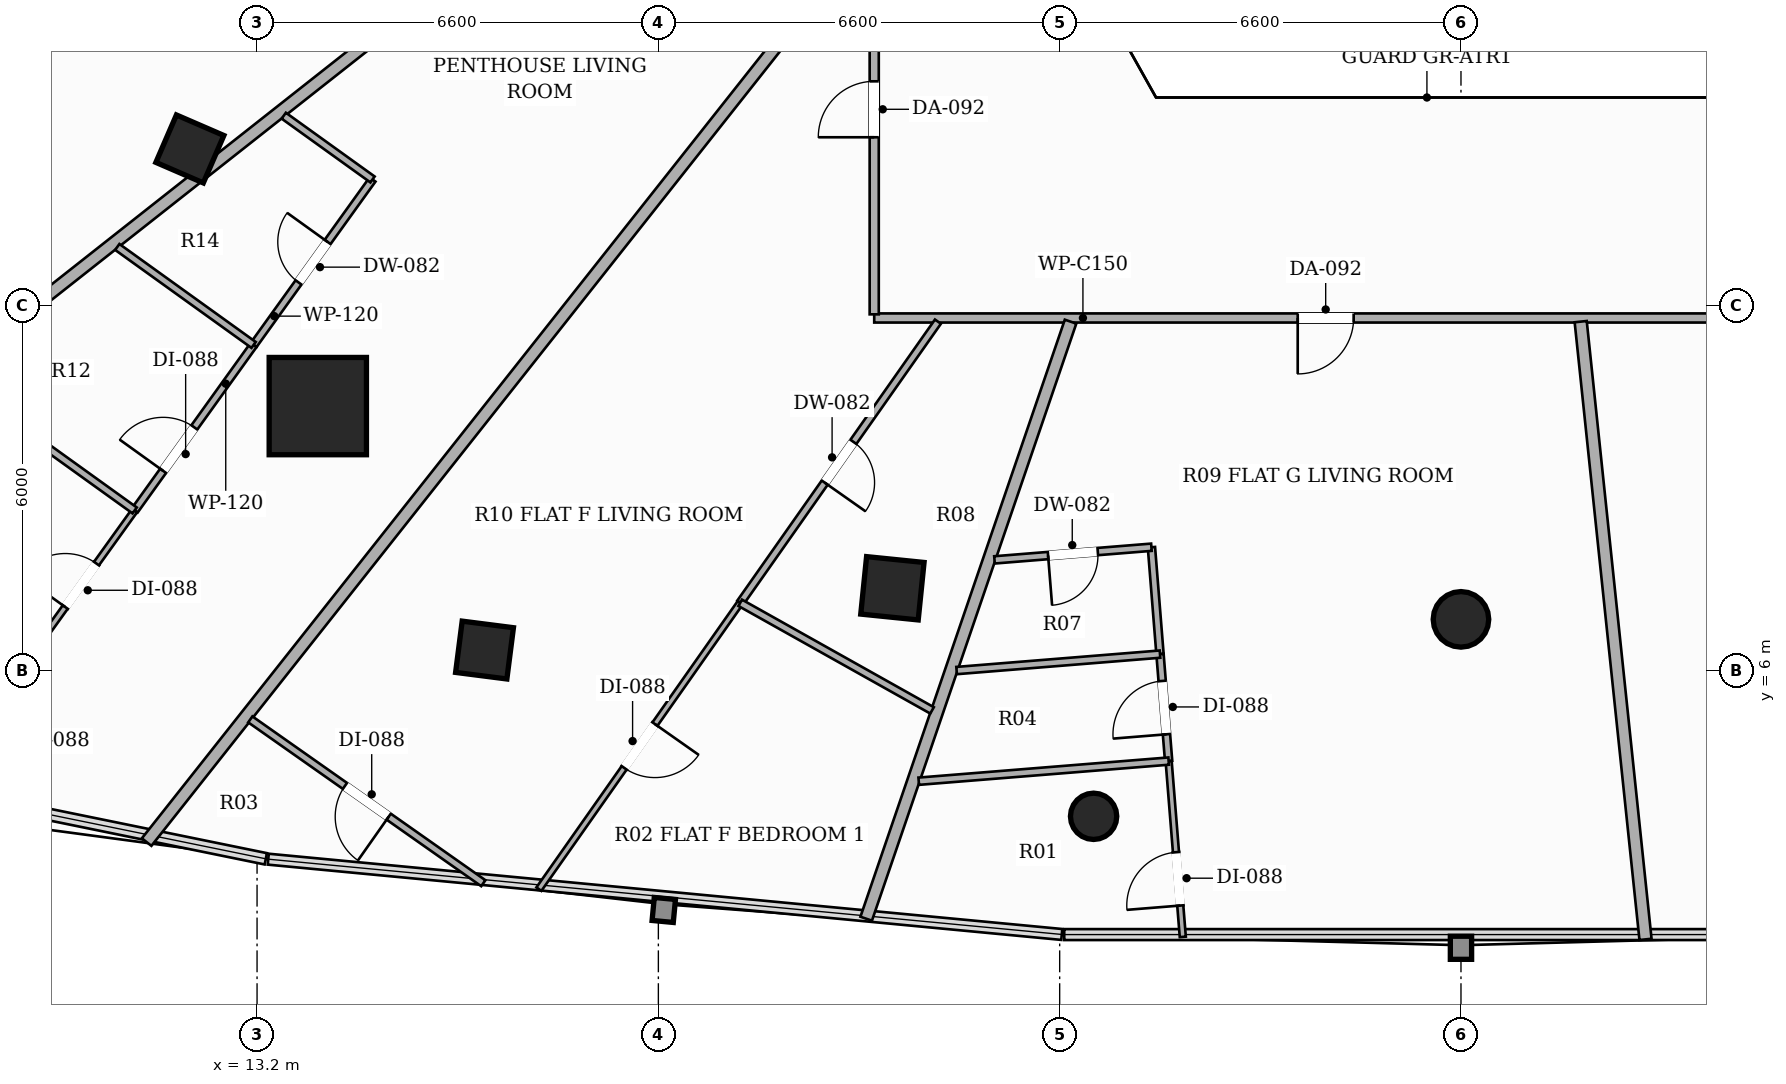
"""IFC4 building model, lengths in metres.
Left out: names, types, materials, properties, quantities, classifications, styles, units other than length and angle.
Written with IfcOpenShell. Run it as: python <this file> out.ifc"""

import sys

from ifc_helpers import new_model, si_unit, direction, frame, frame_2d, origin, origin_2d, place, context, subcontext, project, spatial, rectangle, hollow_rectangle, hollow_circle, extrude, element, fill, save


model = new_model("IFC4")
c1 = context("Model", 3, precision=1e-05, world=origin(), true_north=direction((0.0, 1.0)))
c2 = subcontext(c1, "Body", "Model", "MODEL_VIEW")
j1 = project(units=[si_unit("LENGTHUNIT", "METRE"), si_unit("PLANEANGLEUNIT", "RADIAN")], contexts=[c1])
p1 = place(None, origin())
s1 = spatial("IfcSite", under=j1, at=p1, CompositionType="ELEMENT")
p2 = place(p1, origin())
s2 = spatial("IfcBuilding", under=s1, at=p2, CompositionType="ELEMENT")
p3 = place(p2, frame((0.0, 0.0, 56.6)))
s3 = spatial("IfcBuildingStorey", under=s2, at=p3, CompositionType="ELEMENT", Elevation=56.6)
p4 = place(p3, frame((14.199, 10.351, 0.0), z_axis=(0.0, 0.0, 1.0), x_axis=(1.0, 0.0, 0.0)))
e1 = element("IfcColumn", 1, at=p4, inside=s3, PredefinedType="COLUMN", context=c2, shape_type="SweptSolid", body=[
    extrude(hollow_rectangle(XDim=1.6, YDim=1.6, WallThickness=0.05, at=origin_2d()), origin(), (0.0, 0.0, 1.0), 3.3),
])
p5 = place(p3, frame((23.649, 7.355, 0.0), z_axis=(0.0, 0.0, 1.0), x_axis=(-0.994880708829, 0.101056297183, 0.0)))
e2 = element("IfcColumn", 2, at=p5, inside=s3, PredefinedType="COLUMN", context=c2, shape_type="SweptSolid", body=[
    extrude(hollow_rectangle(XDim=0.95, YDim=0.95, WallThickness=0.032, at=origin_2d()), origin(), (0.0, 0.0, 1.0), 3.3),
])
p6 = place(p3, frame((33.0, 6.844, 0.0), z_axis=(0.0, 0.0, 1.0), x_axis=(1.0, 0.0, 0.0)))
e3 = element("IfcColumn", 3, at=p6, inside=s3, PredefinedType="COLUMN", context=c2, shape_type="SweptSolid", body=[
    extrude(hollow_circle(Radius=0.457, WallThickness=0.025, at=origin_2d()), origin(), (0.0, 0.0, 1.0), 3.3),
])
for number, where, z_axis, x_axis in (
    (4, (12.095, 14.58, 0.0), (0.0, 0.0, 1.0), (0.397, 0.918, 0.0)),
    (5, (16.941, 6.339, 0.0), (0.0, 0.0, 1.0), (-0.992, 0.127, 0.0)),
):
    element("IfcColumn", number, at=place(p3, frame(where, z_axis=z_axis, x_axis=x_axis)), inside=s3, PredefinedType="COLUMN", context=c2, shape_type="SweptSolid", body=[
        extrude(hollow_rectangle(XDim=0.85, YDim=0.85, WallThickness=0.028, at=origin_2d()), origin(), (0.0, 0.0, 1.0), 3.3),
    ])
p7 = place(p3, frame((26.958, 3.605, 0.0), z_axis=(0.0, 0.0, 1.0), x_axis=(1.0, 0.0, 0.0)))
e6 = element("IfcColumn", 6, at=p7, inside=s3, PredefinedType="COLUMN", context=c2, shape_type="SweptSolid", body=[
    extrude(hollow_circle(Radius=0.381, WallThickness=0.022, at=origin_2d()), origin(), (0.0, 0.0, 1.0), 3.3),
])
p8 = place(p3, frame((42.59, 11.8, 0.0), z_axis=(0.0, 0.0, 1.0), x_axis=(-1.0, 0.0, 0.0)))
e7 = element("IfcWall", 7, at=p8, inside=s3, PredefinedType="PARTITIONING", context=c2, shape_type="SweptSolid", body=[
    extrude(rectangle(XDim=19.24, YDim=0.15, at=frame_2d((9.62, 0.0))), origin(), (0.0, 0.0, 1.0), 2.629),
])
p9 = place(p8, frame((11.355, 0.0, 0.0)))
e8 = element("IfcOpeningElement", 8, at=p9, cuts=e7, PredefinedType="OPENING", context=c2, shape_type="SweptSolid", body=[
    extrude(rectangle(XDim=0.92, YDim=2.15, at=frame_2d((0.46, 1.075))), frame((0.0, 0.085, 0.0), z_axis=(0.0, -1.0, 0.0), x_axis=(1.0, 0.0, 0.0)), (0.0, 0.0, 1.0), 0.17),
])
p10 = place(p8, frame((3.524, 0.0, 0.0)))
e9 = element("IfcOpeningElement", 9, at=p10, cuts=e7, PredefinedType="OPENING", context=c2, shape_type="SweptSolid", body=[
    extrude(rectangle(XDim=0.88, YDim=2.1, at=frame_2d((0.44, 1.05))), frame((0.0, 0.085, 0.0), z_axis=(0.0, -1.0, 0.0), x_axis=(1.0, 0.0, 0.0)), (0.0, 0.0, 1.0), 0.17),
])
p11 = place(p3, frame((23.35, 11.86, 0.0), z_axis=(0.0, 0.0, 1.0), x_axis=(0.0, 1.0, 0.0)))
e10 = element("IfcWall", 10, at=p11, inside=s3, PredefinedType="PARTITIONING", context=c2, shape_type="SweptSolid", body=[
    extrude(rectangle(XDim=25.04, YDim=0.15, at=frame_2d((12.52, 0.0))), origin(), (0.0, 0.0, 1.0), 2.373),
])
p12 = place(p11, frame((15.434, 0.0, 0.0)))
e11 = element("IfcOpeningElement", 11, at=p12, cuts=e10, PredefinedType="OPENING", context=c2, shape_type="SweptSolid", body=[
    extrude(rectangle(XDim=0.88, YDim=2.1, at=frame_2d((0.44, 1.05))), frame((0.0, 0.085, 0.0), z_axis=(0.0, -1.0, 0.0), x_axis=(1.0, 0.0, 0.0)), (0.0, 0.0, 1.0), 0.17),
])
p13 = place(p11, frame((22.315, 0.0, 0.0)))
e12 = element("IfcOpeningElement", 12, at=p13, cuts=e10, PredefinedType="OPENING", context=c2, shape_type="SweptSolid", body=[
    extrude(rectangle(XDim=0.88, YDim=2.1, at=frame_2d((0.44, 1.05))), frame((0.0, 0.085, 0.0), z_axis=(0.0, -1.0, 0.0), x_axis=(1.0, 0.0, 0.0)), (0.0, 0.0, 1.0), 0.17),
])
p14 = place(p11, frame((8.21, 0.0, 0.0)))
e13 = element("IfcOpeningElement", 13, at=p14, cuts=e10, PredefinedType="OPENING", context=c2, shape_type="SweptSolid", body=[
    extrude(rectangle(XDim=0.92, YDim=2.15, at=frame_2d((0.46, 1.075))), frame((0.0, 0.085, 0.0), z_axis=(0.0, -1.0, 0.0), x_axis=(1.0, 0.0, 0.0)), (0.0, 0.0, 1.0), 0.17),
])
p15 = place(p11, frame((2.912, 0.0, 0.0)))
e14 = element("IfcOpeningElement", 14, at=p15, cuts=e10, PredefinedType="OPENING", context=c2, shape_type="SweptSolid", body=[
    extrude(rectangle(XDim=0.92, YDim=2.15, at=frame_2d((0.46, 1.075))), frame((0.0, 0.085, 0.0), z_axis=(0.0, -1.0, 0.0), x_axis=(1.0, 0.0, 0.0)), (0.0, 0.0, 1.0), 0.17),
])
p16 = place(p3, frame((23.29, 22.844, 0.0), z_axis=(0.0, 0.0, 1.0), x_axis=(-0.785302077685, -0.619112790034, 0.0)))
e15 = element("IfcWall", 15, at=p16, inside=s3, PredefinedType="PARTITIONING", context=c2, shape_type="SweptSolid", body=[
    extrude(rectangle(XDim=22.957, YDim=0.2, at=frame_2d((11.479, 0.0))), origin(), (0.0, 0.0, 1.0), 2.373),
])
p17 = place(p3, frame((23.29, 18.228, 0.0), z_axis=(0.0, 0.0, 1.0), x_axis=(-0.620501189922, -0.784205504511, 0.0)))
e16 = element("IfcWall", 16, at=p17, inside=s3, PredefinedType="PARTITIONING", context=c2, shape_type="SweptSolid", body=[
    extrude(rectangle(XDim=19.188, YDim=0.2, at=frame_2d((9.594, 0.0))), origin(), (0.0, 0.0, 1.0), 2.373),
])
p18 = place(p3, frame((26.579, 11.74, 0.0), z_axis=(0.0, 0.0, 1.0), x_axis=(-0.32385337678, -0.946107282684, 0.0)))
e17 = element("IfcWall", 17, at=p18, inside=s3, PredefinedType="PARTITIONING", context=c2, shape_type="SweptSolid", body=[
    extrude(rectangle(XDim=10.378, YDim=0.2, at=frame_2d((5.189, 0.0))), origin(), (0.0, 0.0, 1.0), 2.373),
])
p19 = place(p3, frame((34.969, 11.74, 0.0), z_axis=(0.0, 0.0, 1.0), x_axis=(0.10435134466, -0.994540495338, 0.0)))
e18 = element("IfcWall", 18, at=p19, inside=s3, PredefinedType="PARTITIONING", context=c2, shape_type="SweptSolid", body=[
    extrude(rectangle(XDim=10.215, YDim=0.2, at=frame_2d((5.107, 0.0))), origin(), (0.0, 0.0, 1.0), 2.373),
])
p20 = place(p3, frame((13.143, 11.357, 0.0), z_axis=(0.0, 0.0, 1.0), x_axis=(0.583709603858, 0.811962498127, 0.0)))
e19 = element("IfcWall", 19, at=p20, inside=s3, PredefinedType="PARTITIONING", context=c2, shape_type="SweptSolid", body=[
    extrude(rectangle(XDim=3.351, YDim=0.12, at=frame_2d((1.676, 0.0))), origin(), (0.0, 0.0, 1.0), 2.373),
])
p21 = place(p20, frame((1.266, 0.0, 0.0)))
e20 = element("IfcOpeningElement", 20, at=p21, cuts=e19, PredefinedType="OPENING", context=c2, shape_type="SweptSolid", body=[
    extrude(rectangle(XDim=0.82, YDim=2.1, at=frame_2d((0.41, 1.05))), frame((0.0, 0.07, 0.0), z_axis=(0.0, -1.0, 0.0), x_axis=(1.0, 0.0, 0.0)), (0.0, 0.0, 1.0), 0.14),
])
p22 = place(p3, frame((15.099, 14.078, 0.0), z_axis=(0.0, 0.0, 1.0), x_axis=(-0.812134003072, 0.583470959906, 0.0)))
e21 = element("IfcWall", 21, at=p22, inside=s3, PredefinedType="PARTITIONING", context=c2, shape_type="SweptSolid", body=[
    extrude(rectangle(XDim=1.798, YDim=0.12, at=frame_2d((0.899, 0.0))), origin(), (0.0, 0.0, 1.0), 3.02),
])
p23 = place(p3, frame((11.187, 8.635, 0.0), z_axis=(0.0, 0.0, 1.0), x_axis=(0.583571510595, 0.812061753823, 0.0)))
e22 = element("IfcWall", 22, at=p23, inside=s3, PredefinedType="PARTITIONING", context=c2, shape_type="SweptSolid", body=[
    extrude(rectangle(XDim=3.352, YDim=0.12, at=frame_2d((1.676, 0.0))), origin(), (0.0, 0.0, 1.0), 2.579),
])
p24 = place(p23, frame((0.802, 0.0, 0.0)))
e23 = element("IfcOpeningElement", 23, at=p24, cuts=e22, PredefinedType="OPENING", context=c2, shape_type="SweptSolid", body=[
    extrude(rectangle(XDim=0.88, YDim=2.1, at=frame_2d((0.44, 1.05))), frame((0.0, 0.07, 0.0), z_axis=(0.0, -1.0, 0.0), x_axis=(1.0, 0.0, 0.0)), (0.0, 0.0, 1.0), 0.14),
])
p25 = place(p3, frame((9.417, 6.172, 0.0), z_axis=(0.0, 0.0, 1.0), x_axis=(0.583596240012, 0.812043981964, 0.0)))
e24 = element("IfcWall", 24, at=p25, inside=s3, PredefinedType="PARTITIONING", context=c2, shape_type="SweptSolid", body=[
    extrude(rectangle(XDim=3.033, YDim=0.1, at=frame_2d((1.517, 0.0))), origin(), (0.0, 0.0, 1.0), 2.579),
])
p26 = place(p25, frame((1.077, 0.0, 0.0)))
e25 = element("IfcOpeningElement", 25, at=p26, cuts=e24, PredefinedType="OPENING", context=c2, shape_type="SweptSolid", body=[
    extrude(rectangle(XDim=0.88, YDim=2.1, at=frame_2d((0.44, 1.05))), frame((0.0, 0.06, 0.0), z_axis=(0.0, -1.0, 0.0), x_axis=(1.0, 0.0, 0.0)), (0.0, 0.0, 1.0), 0.12),
])
p27 = place(p3, frame((13.143, 11.357, 0.0), z_axis=(0.0, 0.0, 1.0), x_axis=(-0.812099176387, 0.583519432162, 0.0)))
e26 = element("IfcWall", 26, at=p27, inside=s3, PredefinedType="PARTITIONING", context=c2, shape_type="SweptSolid", body=[
    extrude(rectangle(XDim=2.761, YDim=0.12, at=frame_2d((1.38, 0.0))), origin(), (0.0, 0.0, 1.0), 3.02),
])
p28 = place(p3, frame((11.187, 8.635, 0.0), z_axis=(0.0, 0.0, 1.0), x_axis=(-0.812025077548, 0.583622543629, 0.0)))
e27 = element("IfcWall", 27, at=p28, inside=s3, PredefinedType="PARTITIONING", context=c2, shape_type="SweptSolid", body=[
    extrude(rectangle(XDim=3.725, YDim=0.12, at=frame_2d((1.863, 0.0))), origin(), (0.0, 0.0, 1.0), 2.579),
])
p29 = place(p3, frame((24.398, 11.74, 0.0), z_axis=(0.0, 0.0, 1.0), x_axis=(-0.575258030062, -0.817972003707, 0.0)))
e28 = element("IfcWall", 28, at=p29, inside=s3, PredefinedType="PARTITIONING", context=c2, shape_type="SweptSolid", body=[
    extrude(rectangle(XDim=5.653, YDim=0.12, at=frame_2d((2.827, 0.0))), origin(), (0.0, 0.0, 1.0), 2.373),
])
p30 = place(p29, frame((2.417, 0.0, 0.0)))
e29 = element("IfcOpeningElement", 29, at=p30, cuts=e28, PredefinedType="OPENING", context=c2, shape_type="SweptSolid", body=[
    extrude(rectangle(XDim=0.82, YDim=2.1, at=frame_2d((0.41, 1.05))), frame((0.0, 0.07, 0.0), z_axis=(0.0, -1.0, 0.0), x_axis=(1.0, 0.0, 0.0)), (0.0, 0.0, 1.0), 0.14),
])
p31 = place(p3, frame((16.921, 2.505, 0.0), z_axis=(0.0, 0.0, 1.0), x_axis=(-0.818042569522, 0.575157677902, 0.0)))
e30 = element("IfcWall", 30, at=p31, inside=s3, PredefinedType="PARTITIONING", context=c2, shape_type="SweptSolid", body=[
    extrude(rectangle(XDim=4.684, YDim=0.12, at=frame_2d((2.342, 0.0))), origin(), (0.0, 0.0, 1.0), 2.579),
])
p32 = place(p31, frame((1.902, 0.0, 0.0)))
e31 = element("IfcOpeningElement", 31, at=p32, cuts=e30, PredefinedType="OPENING", context=c2, shape_type="SweptSolid", body=[
    extrude(rectangle(XDim=0.88, YDim=2.1, at=frame_2d((0.44, 1.05))), frame((0.0, 0.07, 0.0), z_axis=(0.0, -1.0, 0.0), x_axis=(1.0, 0.0, 0.0)), (0.0, 0.0, 1.0), 0.14),
])
p33 = place(p3, frame((21.146, 7.116, 0.0), z_axis=(0.0, 0.0, 1.0), x_axis=(-0.575180299529, -0.818026664011, 0.0)))
e32 = element("IfcWall", 32, at=p33, inside=s3, PredefinedType="PARTITIONING", context=c2, shape_type="SweptSolid", body=[
    extrude(rectangle(XDim=5.757, YDim=0.1, at=frame_2d((2.878, 0.0))), origin(), (0.0, 0.0, 1.0), 2.373),
])
p34 = place(p33, frame((2.438, 0.0, 0.0)))
e33 = element("IfcOpeningElement", 33, at=p34, cuts=e32, PredefinedType="OPENING", context=c2, shape_type="SweptSolid", body=[
    extrude(rectangle(XDim=0.88, YDim=2.1, at=frame_2d((0.44, 1.05))), frame((0.0, 0.06, 0.0), z_axis=(0.0, -1.0, 0.0), x_axis=(1.0, 0.0, 0.0)), (0.0, 0.0, 1.0), 0.12),
])
p35 = place(p3, frame((24.301, 5.347, 0.0), z_axis=(0.0, 0.0, 1.0), x_axis=(-0.872243471816, 0.48907190256, 0.0)))
e34 = element("IfcWall", 34, at=p35, inside=s3, PredefinedType="PARTITIONING", context=c2, shape_type="SweptSolid", body=[
    extrude(rectangle(XDim=3.617, YDim=0.12, at=frame_2d((1.809, 0.0))), origin(), (0.0, 0.0, 1.0), 2.373),
])
p36 = place(p3, frame((28.05, 6.272, 0.0), z_axis=(0.0, 0.0, 1.0), x_axis=(-0.080009304194, 0.996794116778, 0.0)))
e35 = element("IfcWall", 35, at=p36, inside=s3, PredefinedType="PARTITIONING", context=c2, shape_type="SweptSolid", body=[
    extrude(rectangle(XDim=1.764, YDim=0.12, at=frame_2d((0.882, 0.0))), origin(), (0.0, 0.0, 1.0), 3.02),
])
p37 = place(p3, frame((27.909, 8.03, 0.0), z_axis=(0.0, 0.0, 1.0), x_axis=(-0.996768339954, -0.080329798112, 0.0)))
e36 = element("IfcWall", 36, at=p37, inside=s3, PredefinedType="PARTITIONING", context=c2, shape_type="SweptSolid", body=[
    extrude(rectangle(XDim=2.589, YDim=0.12, at=frame_2d((1.295, 0.0))), origin(), (0.0, 0.0, 1.0), 3.02),
])
p38 = place(p37, frame((0.885, 0.0, 0.0)))
e37 = element("IfcOpeningElement", 37, at=p38, cuts=e36, PredefinedType="OPENING", context=c2, shape_type="SweptSolid", body=[
    extrude(rectangle(XDim=0.82, YDim=2.1, at=frame_2d((0.41, 1.05))), frame((0.0, 0.07, 0.0), z_axis=(0.0, -1.0, 0.0), x_axis=(1.0, 0.0, 0.0)), (0.0, 0.0, 1.0), 0.14),
])
p39 = place(p3, frame((28.192, 4.513, 0.0), z_axis=(0.0, 0.0, 1.0), x_axis=(-0.080377539135, 0.996764491343, 0.0)))
e38 = element("IfcWall", 38, at=p39, inside=s3, PredefinedType="PARTITIONING", context=c2, shape_type="SweptSolid", body=[
    extrude(rectangle(XDim=1.765, YDim=0.12, at=frame_2d((0.882, 0.0))), origin(), (0.0, 0.0, 1.0), 2.373),
])
p40 = place(p39, frame((0.442, 0.0, 0.0)))
e39 = element("IfcOpeningElement", 39, at=p40, cuts=e38, PredefinedType="OPENING", context=c2, shape_type="SweptSolid", body=[
    extrude(rectangle(XDim=0.88, YDim=2.1, at=frame_2d((0.44, 1.05))), frame((0.0, 0.07, 0.0), z_axis=(0.0, -1.0, 0.0), x_axis=(1.0, 0.0, 0.0)), (0.0, 0.0, 1.0), 0.14),
])
p41 = place(p3, frame((28.425, 1.622, 0.0), z_axis=(0.0, 0.0, 1.0), x_axis=(-0.080390934681, 0.996763411057, 0.0)))
e40 = element("IfcWall", 40, at=p41, inside=s3, PredefinedType="PARTITIONING", context=c2, shape_type="SweptSolid", body=[
    extrude(rectangle(XDim=2.9, YDim=0.1, at=frame_2d((1.45, 0.0))), origin(), (0.0, 0.0, 1.0), 2.373),
])
p42 = place(p41, frame((0.517, 0.0, 0.0)))
e41 = element("IfcOpeningElement", 41, at=p42, cuts=e40, PredefinedType="OPENING", context=c2, shape_type="SweptSolid", body=[
    extrude(rectangle(XDim=0.88, YDim=2.1, at=frame_2d((0.44, 1.05))), frame((0.0, 0.06, 0.0), z_axis=(0.0, -1.0, 0.0), x_axis=(1.0, 0.0, 0.0)), (0.0, 0.0, 1.0), 0.12),
])
p43 = place(p3, frame((28.05, 6.272, 0.0), z_axis=(0.0, 0.0, 1.0), x_axis=(-0.99675765278, -0.080462299392, 0.0)))
e42 = element("IfcWall", 42, at=p43, inside=s3, PredefinedType="PARTITIONING", context=c2, shape_type="SweptSolid", body=[
    extrude(rectangle(XDim=3.356, YDim=0.12, at=frame_2d((1.678, 0.0))), origin(), (0.0, 0.0, 1.0), 2.373),
])
p44 = place(p3, frame((28.192, 4.513, 0.0), z_axis=(0.0, 0.0, 1.0), x_axis=(-0.996771449714, -0.080291201486, 0.0)))
e43 = element("IfcWall", 43, at=p44, inside=s3, PredefinedType="PARTITIONING", context=c2, shape_type="SweptSolid", body=[
    extrude(rectangle(XDim=4.123, YDim=0.12, at=frame_2d((2.062, 0.0))), origin(), (0.0, 0.0, 1.0), 2.373),
])
p45 = place(p21, origin())
e44 = element("IfcDoor", 44, at=p45, inside=s3, OperationType="SINGLE_SWING_RIGHT", PredefinedType="DOOR", context=c2, shape_type="SweptSolid", body=[
    extrude(rectangle(XDim=0.82, YDim=2.1, at=frame_2d((0.41, 1.05))), frame((0.0, 0.025, 0.0), z_axis=(0.0, -1.0, 0.0), x_axis=(1.0, 0.0, 0.0)), (0.0, 0.0, 1.0), 0.05),
])
fill(e20, e44)
p46 = place(p24, origin())
e45 = element("IfcDoor", 45, at=p46, inside=s3, OperationType="SINGLE_SWING_LEFT", PredefinedType="DOOR", context=c2, shape_type="SweptSolid", body=[
    extrude(rectangle(XDim=0.88, YDim=2.1, at=frame_2d((0.44, 1.05))), frame((0.0, 0.025, 0.0), z_axis=(0.0, -1.0, 0.0), x_axis=(1.0, 0.0, 0.0)), (0.0, 0.0, 1.0), 0.05),
])
fill(e23, e45)
p47 = place(p26, origin())
e46 = element("IfcDoor", 46, at=p47, inside=s3, OperationType="SINGLE_SWING_LEFT", PredefinedType="DOOR", context=c2, shape_type="SweptSolid", body=[
    extrude(rectangle(XDim=0.88, YDim=2.1, at=frame_2d((0.44, 1.05))), frame((0.0, 0.025, 0.0), z_axis=(0.0, -1.0, 0.0), x_axis=(1.0, 0.0, 0.0)), (0.0, 0.0, 1.0), 0.05),
])
fill(e25, e46)
p48 = place(p15, origin())
e47 = element("IfcDoor", 47, at=p48, inside=s3, OperationType="SINGLE_SWING_LEFT", PredefinedType="DOOR", context=c2, shape_type="SweptSolid", body=[
    extrude(rectangle(XDim=0.92, YDim=2.15, at=frame_2d((0.46, 1.075))), frame((0.0, 0.025, 0.0), z_axis=(0.0, -1.0, 0.0), x_axis=(1.0, 0.0, 0.0)), (0.0, 0.0, 1.0), 0.05),
])
fill(e14, e47)
p49 = place(p30, origin())
e48 = element("IfcDoor", 48, at=p49, inside=s3, OperationType="SINGLE_SWING_RIGHT", PredefinedType="DOOR", context=c2, shape_type="SweptSolid", body=[
    extrude(rectangle(XDim=0.82, YDim=2.1, at=frame_2d((0.41, 1.05))), frame((0.0, 0.025, 0.0), z_axis=(0.0, -1.0, 0.0), x_axis=(1.0, 0.0, 0.0)), (0.0, 0.0, 1.0), 0.05),
])
fill(e29, e48)
p50 = place(p32, origin())
e49 = element("IfcDoor", 49, at=p50, inside=s3, OperationType="SINGLE_SWING_LEFT", PredefinedType="DOOR", context=c2, shape_type="SweptSolid", body=[
    extrude(rectangle(XDim=0.88, YDim=2.1, at=frame_2d((0.44, 1.05))), frame((0.0, 0.025, 0.0), z_axis=(0.0, -1.0, 0.0), x_axis=(1.0, 0.0, 0.0)), (0.0, 0.0, 1.0), 0.05),
])
fill(e31, e49)
p51 = place(p34, origin())
e50 = element("IfcDoor", 50, at=p51, inside=s3, OperationType="SINGLE_SWING_LEFT", PredefinedType="DOOR", context=c2, shape_type="SweptSolid", body=[
    extrude(rectangle(XDim=0.88, YDim=2.1, at=frame_2d((0.44, 1.05))), frame((0.0, 0.025, 0.0), z_axis=(0.0, -1.0, 0.0), x_axis=(1.0, 0.0, 0.0)), (0.0, 0.0, 1.0), 0.05),
])
fill(e33, e50)
p52 = place(p9, origin())
e51 = element("IfcDoor", 51, at=p52, inside=s3, OperationType="SINGLE_SWING_RIGHT", PredefinedType="DOOR", context=c2, shape_type="SweptSolid", body=[
    extrude(rectangle(XDim=0.92, YDim=2.15, at=frame_2d((0.46, 1.075))), frame((0.0, 0.025, 0.0), z_axis=(0.0, -1.0, 0.0), x_axis=(1.0, 0.0, 0.0)), (0.0, 0.0, 1.0), 0.05),
])
fill(e8, e51)
p53 = place(p38, origin())
e52 = element("IfcDoor", 52, at=p53, inside=s3, OperationType="SINGLE_SWING_RIGHT", PredefinedType="DOOR", context=c2, shape_type="SweptSolid", body=[
    extrude(rectangle(XDim=0.82, YDim=2.1, at=frame_2d((0.41, 1.05))), frame((0.0, 0.025, 0.0), z_axis=(0.0, -1.0, 0.0), x_axis=(1.0, 0.0, 0.0)), (0.0, 0.0, 1.0), 0.05),
])
fill(e37, e52)
p54 = place(p40, origin())
e53 = element("IfcDoor", 53, at=p54, inside=s3, OperationType="SINGLE_SWING_LEFT", PredefinedType="DOOR", context=c2, shape_type="SweptSolid", body=[
    extrude(rectangle(XDim=0.88, YDim=2.1, at=frame_2d((0.44, 1.05))), frame((0.0, 0.025, 0.0), z_axis=(0.0, -1.0, 0.0), x_axis=(1.0, 0.0, 0.0)), (0.0, 0.0, 1.0), 0.05),
])
fill(e39, e53)
p55 = place(p42, origin())
e54 = element("IfcDoor", 54, at=p55, inside=s3, OperationType="SINGLE_SWING_LEFT", PredefinedType="DOOR", context=c2, shape_type="SweptSolid", body=[
    extrude(rectangle(XDim=0.88, YDim=2.1, at=frame_2d((0.44, 1.05))), frame((0.0, 0.025, 0.0), z_axis=(0.0, -1.0, 0.0), x_axis=(1.0, 0.0, 0.0)), (0.0, 0.0, 1.0), 0.05),
])
fill(e41, e54)
save(model, sys.argv[1])
